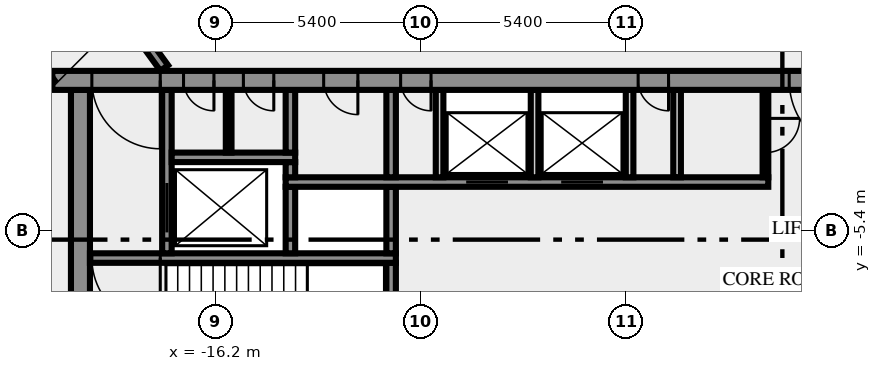
"""IFC4 building model, lengths in metres.
Left out: names, types, materials, properties, quantities, classifications, styles, units other than length and angle.
Written with IfcOpenShell. Run it as: python <this file> out.ifc"""

import sys

from ifc_helpers import new_model, si_unit, direction, frame, frame_2d, origin, place, context, subcontext, project, spatial, rectangle, extrude, element, fill, save


model = new_model("IFC4")
c1 = context("Model", 3, precision=1e-05, world=origin(), true_north=direction((0.0, 1.0)))
c2 = subcontext(c1, "Body", "Model", "MODEL_VIEW")
j1 = project(units=[si_unit("LENGTHUNIT", "METRE"), si_unit("PLANEANGLEUNIT", "RADIAN")], contexts=[c1])
p1 = place(None, origin())
s1 = spatial("IfcSite", under=j1, at=p1, CompositionType="ELEMENT")
p2 = place(p1, origin())
s2 = spatial("IfcBuilding", under=s1, at=p2, CompositionType="ELEMENT")
p3 = place(p2, frame((0.0, 0.0, 281.0)))
s3 = spatial("IfcBuildingStorey", under=s2, at=p3, CompositionType="ELEMENT", Elevation=281.0)
p4 = place(p3, frame((-19.75, -10.5, 0.0), z_axis=(0.0, 0.0, 1.0), x_axis=(0.0, 1.0, 0.0)))
e1 = element("IfcWall", 1, at=p4, inside=s3, PredefinedType="SHEAR", context=c2, shape_type="SweptSolid", body=[
    extrude(rectangle(XDim=8.8, YDim=0.5, at=frame_2d((4.4, 0.0))), origin(), (0.0, 0.0, 1.0), 3.65),
])
p5 = place(p3, frame((-11.575, -7.25, 0.0), z_axis=(0.0, 0.0, 1.0), x_axis=(0.0, 1.0, 0.0)))
e2 = element("IfcWall", 2, at=p5, inside=s3, PredefinedType="SHEAR", context=c2, shape_type="SweptSolid", body=[
    extrude(rectangle(XDim=1.0, YDim=0.25, at=frame_2d((0.5, 0.0))), origin(), (0.0, 0.0, 1.0), 3.65),
])
p6 = place(p3, frame((-11.45, -6.125, 0.0), z_axis=(0.0, 0.0, 1.0), x_axis=(-1.0, 0.0, 0.0)))
e3 = element("IfcWall", 3, at=p6, inside=s3, PredefinedType="SHEAR", context=c2, shape_type="SweptSolid", body=[
    extrude(rectangle(XDim=8.05, YDim=0.25, at=frame_2d((4.025, 0.0))), origin(), (0.0, 0.0, 1.0), 3.65),
])
p7 = place(p6, frame((6.2, 0.0, 0.0)))
e4 = element("IfcOpeningElement", 4, at=p7, cuts=e3, PredefinedType="OPENING", context=c2, shape_type="SweptSolid", body=[
    extrude(rectangle(XDim=1.8, YDim=2.1, at=frame_2d((0.9, 1.05))), frame((0.0, 0.135, 0.0), z_axis=(0.0, -1.0, 0.0), x_axis=(1.0, 0.0, 0.0)), (0.0, 0.0, 1.0), 0.27),
])
p8 = place(p3, frame((-17.475, -6.0, 0.0), z_axis=(0.0, 0.0, 1.0), x_axis=(0.0, 1.0, 0.0)))
e5 = element("IfcWall", 5, at=p8, inside=s3, PredefinedType="SHEAR", context=c2, shape_type="SweptSolid", body=[
    extrude(rectangle(XDim=4.3, YDim=0.25, at=frame_2d((2.15, 0.0))), origin(), (0.0, 0.0, 1.0), 3.65),
])
p9 = place(p8, frame((0.55, 0.0, 0.0)))
e6 = element("IfcOpeningElement", 6, at=p9, cuts=e5, PredefinedType="OPENING", context=c2, shape_type="SweptSolid", body=[
    extrude(rectangle(XDim=1.3, YDim=2.1, at=frame_2d((0.65, 1.05))), frame((0.0, 0.135, 0.0), z_axis=(0.0, -1.0, 0.0), x_axis=(1.0, 0.0, 0.0)), (0.0, 0.0, 1.0), 0.27),
])
for number, where, z_axis, x_axis in (
    (7, (-14.225, -6.0, 0.0), (0.0, 0.0, 1.0), (0.0, 1.0, 0.0)),
    (8, (-11.575, -6.0, 0.0), (0.0, 0.0, 1.0), (0.0, 1.0, 0.0)),
):
    element("IfcWall", number, at=place(p3, frame(where, z_axis=z_axis, x_axis=x_axis)), inside=s3, PredefinedType="SHEAR", context=c2, shape_type="SweptSolid", body=[
        extrude(rectangle(XDim=1.75, YDim=0.25, at=frame_2d((0.875, 0.0))), origin(), (0.0, 0.0, 1.0), 3.65),
    ])
p10 = place(p3, frame((-14.35, -4.125, 0.0), z_axis=(0.0, 0.0, 1.0), x_axis=(1.0, 0.0, 0.0)))
e9 = element("IfcWall", 9, at=p10, inside=s3, PredefinedType="SHEAR", context=c2, shape_type="SweptSolid", body=[
    extrude(rectangle(XDim=12.7, YDim=0.25, at=frame_2d((6.35, 0.0))), origin(), (0.0, 0.0, 1.0), 3.65),
])
p11 = place(p10, frame((4.75, 0.0, 0.0)))
e10 = element("IfcOpeningElement", 10, at=p11, cuts=e9, PredefinedType="OPENING", context=c2, shape_type="SweptSolid", body=[
    extrude(rectangle(XDim=1.1, YDim=2.1, at=frame_2d((0.55, 1.05))), frame((0.0, 0.135, 0.0), z_axis=(0.0, -1.0, 0.0), x_axis=(1.0, 0.0, 0.0)), (0.0, 0.0, 1.0), 0.27),
])
p12 = place(p10, frame((7.25, 0.0, 0.0)))
e11 = element("IfcOpeningElement", 11, at=p12, cuts=e9, PredefinedType="OPENING", context=c2, shape_type="SweptSolid", body=[
    extrude(rectangle(XDim=1.1, YDim=2.1, at=frame_2d((0.55, 1.05))), frame((0.0, 0.135, 0.0), z_axis=(0.0, -1.0, 0.0), x_axis=(1.0, 0.0, 0.0)), (0.0, 0.0, 1.0), 0.27),
])
p13 = place(p3, frame((-14.225, -4.0, 0.0), z_axis=(0.0, 0.0, 1.0), x_axis=(0.0, 1.0, 0.0)))
e12 = element("IfcWall", 12, at=p13, inside=s3, PredefinedType="SHEAR", context=c2, shape_type="SweptSolid", body=[
    extrude(rectangle(XDim=0.4, YDim=0.25, at=frame_2d((0.2, 0.0))), origin(), (0.0, 0.0, 1.0), 3.65),
])
p14 = place(p3, frame((-11.575, -4.0, 0.0), z_axis=(0.0, 0.0, 1.0), x_axis=(0.0, 1.0, 0.0)))
e13 = element("IfcWall", 13, at=p14, inside=s3, PredefinedType="SHEAR", context=c2, shape_type="SweptSolid", body=[
    extrude(rectangle(XDim=2.3, YDim=0.25, at=frame_2d((1.15, 0.0))), origin(), (0.0, 0.0, 1.0), 3.65),
])
for number, where, z_axis, x_axis in (
    (14, (-10.3, -4.0, 0.0), (0.0, 0.0, 1.0), (0.0, 1.0, 0.0)),
    (15, (-7.8, -4.0, 0.0), (0.0, 0.0, 1.0), (0.0, 1.0, 0.0)),
    (16, (-5.3, -4.0, 0.0), (0.0, 0.0, 1.0), (0.0, 1.0, 0.0)),
    (17, (-4.05, -4.0, 0.0), (0.0, 0.0, 1.0), (0.0, 1.0, 0.0)),
):
    element("IfcWall", number, at=place(p3, frame(where, z_axis=z_axis, x_axis=x_axis)), inside=s3, PredefinedType="SOLIDWALL", context=c2, shape_type="SweptSolid", body=[
        extrude(rectangle(XDim=2.3, YDim=0.2, at=frame_2d((1.15, 0.0))), origin(), (0.0, 0.0, 1.0), 3.65),
    ])
p15 = place(p3, frame((-1.725, -1.7, 0.0), z_axis=(0.0, 0.0, 1.0), x_axis=(0.0, -1.0, 0.0)))
e18 = element("IfcWall", 18, at=p15, inside=s3, PredefinedType="PARTITIONING", context=c2, shape_type="SweptSolid", body=[
    extrude(rectangle(XDim=2.3, YDim=0.15, at=frame_2d((1.15, 0.0))), origin(), (0.0, 0.0, 1.0), 3.65),
])
p16 = place(p15, frame((0.75, 0.0, 0.0)))
e19 = element("IfcOpeningElement", 19, at=p16, cuts=e18, PredefinedType="OPENING", context=c2, shape_type="SweptSolid", body=[
    extrude(rectangle(XDim=0.9, YDim=2.1, at=frame_2d((0.45, 1.05))), frame((0.0, 0.085, 0.0), z_axis=(0.0, -1.0, 0.0), x_axis=(1.0, 0.0, 0.0)), (0.0, 0.0, 1.0), 0.17),
])
p17 = place(p3, frame((-17.35, -3.475, 0.0), z_axis=(0.0, 0.0, 1.0), x_axis=(1.0, 0.0, 0.0)))
e20 = element("IfcWall", 20, at=p17, inside=s3, PredefinedType="SHEAR", context=c2, shape_type="SweptSolid", body=[
    extrude(rectangle(XDim=3.25, YDim=0.25, at=frame_2d((1.625, 0.0))), origin(), (0.0, 0.0, 1.0), 3.65),
])
p18 = place(p3, frame((-15.85, -3.35, 0.0), z_axis=(0.0, 0.0, 1.0), x_axis=(0.0, 1.0, 0.0)))
e21 = element("IfcWall", 21, at=p18, inside=s3, PredefinedType="PARTITIONING", context=c2, shape_type="SweptSolid", body=[
    extrude(rectangle(XDim=1.65, YDim=0.15, at=frame_2d((0.825, 0.0))), origin(), (0.0, 0.0, 1.0), 3.65),
])
p19 = place(p3, frame((-14.225, -3.35, 0.0), z_axis=(0.0, 0.0, 1.0), x_axis=(0.0, 1.0, 0.0)))
e22 = element("IfcWall", 22, at=p19, inside=s3, PredefinedType="SHEAR", context=c2, shape_type="SweptSolid", body=[
    extrude(rectangle(XDim=1.65, YDim=0.25, at=frame_2d((0.825, 0.0))), origin(), (0.0, 0.0, 1.0), 3.65),
])
p20 = place(p3, frame((20.49, -1.45, 0.0), z_axis=(0.0, 0.0, 1.0), x_axis=(-1.0, 0.0, 0.0)))
e23 = element("IfcWall", 23, at=p20, inside=s3, PredefinedType="SHEAR", context=c2, shape_type="SweptSolid", body=[
    extrude(rectangle(XDim=40.98, YDim=0.5, at=frame_2d((20.49, 0.0))), origin(), (0.0, 0.0, 1.0), 3.65),
])
p21 = place(p20, frame((38.14, 0.0, 0.0)))
e24 = element("IfcOpeningElement", 24, at=p21, cuts=e23, PredefinedType="OPENING", context=c2, shape_type="SweptSolid", body=[
    extrude(rectangle(XDim=1.8, YDim=2.1, at=frame_2d((0.9, 1.05))), frame((0.0, 0.26, 0.0), z_axis=(0.0, -1.0, 0.0), x_axis=(1.0, 0.0, 0.0)), (0.0, 0.0, 1.0), 0.52),
])
p22 = place(p20, frame((36.728, 0.0, 0.0)))
e25 = element("IfcOpeningElement", 25, at=p22, cuts=e23, PredefinedType="OPENING", context=c2, shape_type="SweptSolid", body=[
    extrude(rectangle(XDim=0.8, YDim=2.1, at=frame_2d((0.4, 1.05))), frame((0.0, 0.26, 0.0), z_axis=(0.0, -1.0, 0.0), x_axis=(1.0, 0.0, 0.0)), (0.0, 0.0, 1.0), 0.52),
])
p23 = place(p20, frame((35.153, 0.0, 0.0)))
e26 = element("IfcOpeningElement", 26, at=p23, cuts=e23, PredefinedType="OPENING", context=c2, shape_type="SweptSolid", body=[
    extrude(rectangle(XDim=0.8, YDim=2.1, at=frame_2d((0.4, 1.05))), frame((0.0, 0.26, 0.0), z_axis=(0.0, -1.0, 0.0), x_axis=(1.0, 0.0, 0.0)), (0.0, 0.0, 1.0), 0.52),
])
p24 = place(p20, frame((32.94, 0.0, 0.0)))
e27 = element("IfcOpeningElement", 27, at=p24, cuts=e23, PredefinedType="OPENING", context=c2, shape_type="SweptSolid", body=[
    extrude(rectangle(XDim=0.9, YDim=2.1, at=frame_2d((0.45, 1.05))), frame((0.0, 0.26, 0.0), z_axis=(0.0, -1.0, 0.0), x_axis=(1.0, 0.0, 0.0)), (0.0, 0.0, 1.0), 0.52),
])
p25 = place(p20, frame((31.015, 0.0, 0.0)))
e28 = element("IfcOpeningElement", 28, at=p25, cuts=e23, PredefinedType="OPENING", context=c2, shape_type="SweptSolid", body=[
    extrude(rectangle(XDim=0.8, YDim=2.1, at=frame_2d((0.4, 1.05))), frame((0.0, 0.26, 0.0), z_axis=(0.0, -1.0, 0.0), x_axis=(1.0, 0.0, 0.0)), (0.0, 0.0, 1.0), 0.52),
])
p26 = place(p20, frame((24.765, 0.0, 0.0)))
e29 = element("IfcOpeningElement", 29, at=p26, cuts=e23, PredefinedType="OPENING", context=c2, shape_type="SweptSolid", body=[
    extrude(rectangle(XDim=0.8, YDim=2.1, at=frame_2d((0.4, 1.05))), frame((0.0, 0.26, 0.0), z_axis=(0.0, -1.0, 0.0), x_axis=(1.0, 0.0, 0.0)), (0.0, 0.0, 1.0), 0.52),
])
p27 = place(p20, frame((19.59, 0.0, 0.0)))
e30 = element("IfcOpeningElement", 30, at=p27, cuts=e23, PredefinedType="OPENING", context=c2, shape_type="SweptSolid", body=[
    extrude(rectangle(XDim=2.0, YDim=2.1, at=frame_2d((1.0, 1.05))), frame((0.0, 0.26, 0.0), z_axis=(0.0, -1.0, 0.0), x_axis=(1.0, 0.0, 0.0)), (0.0, 0.0, 1.0), 0.52),
])
p28 = place(p20, frame((13.202, 0.0, 0.0)))
e31 = element("IfcOpeningElement", 31, at=p28, cuts=e23, PredefinedType="OPENING", context=c2, shape_type="SweptSolid", body=[
    extrude(rectangle(XDim=0.9, YDim=2.1, at=frame_2d((0.45, 1.05))), frame((0.0, 0.26, 0.0), z_axis=(0.0, -1.0, 0.0), x_axis=(1.0, 0.0, 0.0)), (0.0, 0.0, 1.0), 0.52),
])
p29 = place(p20, frame((9.478, 0.0, 0.0)))
e32 = element("IfcOpeningElement", 32, at=p29, cuts=e23, PredefinedType="OPENING", context=c2, shape_type="SweptSolid", body=[
    extrude(rectangle(XDim=0.9, YDim=2.1, at=frame_2d((0.45, 1.05))), frame((0.0, 0.26, 0.0), z_axis=(0.0, -1.0, 0.0), x_axis=(1.0, 0.0, 0.0)), (0.0, 0.0, 1.0), 0.52),
])
p30 = place(p20, frame((7.14, 0.0, 0.0)))
e33 = element("IfcOpeningElement", 33, at=p30, cuts=e23, PredefinedType="OPENING", context=c2, shape_type="SweptSolid", body=[
    extrude(rectangle(XDim=0.9, YDim=2.1, at=frame_2d((0.45, 1.05))), frame((0.0, 0.26, 0.0), z_axis=(0.0, -1.0, 0.0), x_axis=(1.0, 0.0, 0.0)), (0.0, 0.0, 1.0), 0.52),
])
p31 = place(p20, frame((4.19, 0.0, 0.0)))
e34 = element("IfcOpeningElement", 34, at=p31, cuts=e23, PredefinedType="OPENING", context=c2, shape_type="SweptSolid", body=[
    extrude(rectangle(XDim=0.9, YDim=2.1, at=frame_2d((0.45, 1.05))), frame((0.0, 0.26, 0.0), z_axis=(0.0, -1.0, 0.0), x_axis=(1.0, 0.0, 0.0)), (0.0, 0.0, 1.0), 0.52),
])
p32 = place(p20, frame((1.04, 0.0, 0.0)))
e35 = element("IfcOpeningElement", 35, at=p32, cuts=e23, PredefinedType="OPENING", context=c2, shape_type="SweptSolid", body=[
    extrude(rectangle(XDim=1.8, YDim=2.1, at=frame_2d((0.9, 1.05))), frame((0.0, 0.26, 0.0), z_axis=(0.0, -1.0, 0.0), x_axis=(1.0, 0.0, 0.0)), (0.0, 0.0, 1.0), 0.52),
])
p33 = place(p3, frame((-20.531, -1.523, 0.0), z_axis=(0.0, 0.0, 1.0), x_axis=(-0.587786711753, 0.809015934013, 0.0)))
e36 = element("IfcWall", 36, at=p33, inside=s3, PredefinedType="SOLIDWALL", context=c2, shape_type="SweptSolid", body=[
    extrude(rectangle(XDim=21.911, YDim=0.25, at=frame_2d((10.956, 0.0))), origin(), (0.0, 0.0, 1.0), 3.65),
])
p34 = place(p33, frame((0.533, 0.0, 0.0)))
e37 = element("IfcOpeningElement", 37, at=p34, cuts=e36, PredefinedType="OPENING", context=c2, shape_type="SweptSolid", body=[
    extrude(rectangle(XDim=0.9, YDim=2.1, at=frame_2d((0.45, 1.05))), frame((0.0, 0.135, 0.0), z_axis=(0.0, -1.0, 0.0), x_axis=(1.0, 0.0, 0.0)), (0.0, 0.0, 1.0), 0.27),
])
p35 = place(p33, frame((7.816, 0.0, 0.0)))
e38 = element("IfcOpeningElement", 38, at=p35, cuts=e36, PredefinedType="OPENING", context=c2, shape_type="SweptSolid", body=[
    extrude(rectangle(XDim=0.9, YDim=2.1, at=frame_2d((0.45, 1.05))), frame((0.0, 0.135, 0.0), z_axis=(0.0, -1.0, 0.0), x_axis=(1.0, 0.0, 0.0)), (0.0, 0.0, 1.0), 0.27),
])
p36 = place(p3, frame((-31.267, 17.762, 0.0), z_axis=(0.0, 0.0, 1.0), x_axis=(0.587787966774, -0.809015022181, 0.0)))
e39 = element("IfcWall", 39, at=p36, inside=s3, PredefinedType="SOLIDWALL", context=c2, shape_type="SweptSolid", body=[
    extrude(rectangle(XDim=23.345, YDim=0.25, at=frame_2d((11.672, 0.0))), origin(), (0.0, 0.0, 1.0), 3.65),
])
p37 = place(p36, frame((19.004, 0.0, 0.0)))
e40 = element("IfcOpeningElement", 40, at=p37, cuts=e39, PredefinedType="OPENING", context=c2, shape_type="SweptSolid", body=[
    extrude(rectangle(XDim=0.9, YDim=2.1, at=frame_2d((0.45, 1.05))), frame((0.0, 0.135, 0.0), z_axis=(0.0, -1.0, 0.0), x_axis=(1.0, 0.0, 0.0)), (0.0, 0.0, 1.0), 0.27),
])
p38 = place(p7, origin())
e41 = element("IfcDoor", 41, at=p38, inside=s3, OperationType="DOUBLE_DOOR_SINGLE_SWING", PredefinedType="DOOR", context=c2, shape_type="SweptSolid", body=[
    extrude(rectangle(XDim=1.8, YDim=2.1, at=frame_2d((0.9, 1.05))), frame((0.0, 0.025, 0.0), z_axis=(0.0, -1.0, 0.0), x_axis=(1.0, 0.0, 0.0)), (0.0, 0.0, 1.0), 0.05),
])
fill(e4, e41)
p39 = place(p9, origin())
e42 = element("IfcDoor", 42, at=p39, inside=s3, OperationType="DOUBLE_DOOR_SLIDING", PredefinedType="DOOR", context=c2, shape_type="SweptSolid", body=[
    extrude(rectangle(XDim=1.3, YDim=2.1, at=frame_2d((0.65, 1.05))), frame((0.0, 0.025, 0.0), z_axis=(0.0, -1.0, 0.0), x_axis=(1.0, 0.0, 0.0)), (0.0, 0.0, 1.0), 0.05),
])
fill(e6, e42)
p40 = place(p11, origin())
e43 = element("IfcDoor", 43, at=p40, inside=s3, OperationType="DOUBLE_DOOR_SLIDING", PredefinedType="DOOR", context=c2, shape_type="SweptSolid", body=[
    extrude(rectangle(XDim=1.1, YDim=2.1, at=frame_2d((0.55, 1.05))), frame((0.0, 0.025, 0.0), z_axis=(0.0, -1.0, 0.0), x_axis=(1.0, 0.0, 0.0)), (0.0, 0.0, 1.0), 0.05),
])
fill(e10, e43)
p41 = place(p12, origin())
e44 = element("IfcDoor", 44, at=p41, inside=s3, OperationType="DOUBLE_DOOR_SLIDING", PredefinedType="DOOR", context=c2, shape_type="SweptSolid", body=[
    extrude(rectangle(XDim=1.1, YDim=2.1, at=frame_2d((0.55, 1.05))), frame((0.0, 0.025, 0.0), z_axis=(0.0, -1.0, 0.0), x_axis=(1.0, 0.0, 0.0)), (0.0, 0.0, 1.0), 0.05),
])
fill(e11, e44)
p42 = place(p16, origin())
e45 = element("IfcDoor", 45, at=p42, inside=s3, OperationType="SINGLE_SWING_RIGHT", PredefinedType="DOOR", context=c2, shape_type="SweptSolid", body=[
    extrude(rectangle(XDim=0.9, YDim=2.1, at=frame_2d((0.45, 1.05))), frame((0.0, 0.025, 0.0), z_axis=(0.0, -1.0, 0.0), x_axis=(1.0, 0.0, 0.0)), (0.0, 0.0, 1.0), 0.05),
])
fill(e19, e45)
p43 = place(p21, origin())
e46 = element("IfcDoor", 46, at=p43, inside=s3, OperationType="DOUBLE_DOOR_SINGLE_SWING", PredefinedType="DOOR", context=c2, shape_type="SweptSolid", body=[
    extrude(rectangle(XDim=1.8, YDim=2.1, at=frame_2d((0.9, 1.05))), frame((0.0, 0.025, 0.0), z_axis=(0.0, -1.0, 0.0), x_axis=(1.0, 0.0, 0.0)), (0.0, 0.0, 1.0), 0.05),
])
fill(e24, e46)
p44 = place(p22, origin())
e47 = element("IfcDoor", 47, at=p44, inside=s3, OperationType="SINGLE_SWING_RIGHT", PredefinedType="DOOR", context=c2, shape_type="SweptSolid", body=[
    extrude(rectangle(XDim=0.8, YDim=2.1, at=frame_2d((0.4, 1.05))), frame((0.0, 0.025, 0.0), z_axis=(0.0, -1.0, 0.0), x_axis=(1.0, 0.0, 0.0)), (0.0, 0.0, 1.0), 0.05),
])
fill(e25, e47)
p45 = place(p23, origin())
e48 = element("IfcDoor", 48, at=p45, inside=s3, OperationType="SINGLE_SWING_RIGHT", PredefinedType="DOOR", context=c2, shape_type="SweptSolid", body=[
    extrude(rectangle(XDim=0.8, YDim=2.1, at=frame_2d((0.4, 1.05))), frame((0.0, 0.025, 0.0), z_axis=(0.0, -1.0, 0.0), x_axis=(1.0, 0.0, 0.0)), (0.0, 0.0, 1.0), 0.05),
])
fill(e26, e48)
p46 = place(p24, origin())
e49 = element("IfcDoor", 49, at=p46, inside=s3, OperationType="SINGLE_SWING_RIGHT", PredefinedType="DOOR", context=c2, shape_type="SweptSolid", body=[
    extrude(rectangle(XDim=0.9, YDim=2.1, at=frame_2d((0.45, 1.05))), frame((0.0, 0.025, 0.0), z_axis=(0.0, -1.0, 0.0), x_axis=(1.0, 0.0, 0.0)), (0.0, 0.0, 1.0), 0.05),
])
fill(e27, e49)
p47 = place(p25, origin())
e50 = element("IfcDoor", 50, at=p47, inside=s3, OperationType="SINGLE_SWING_RIGHT", PredefinedType="DOOR", context=c2, shape_type="SweptSolid", body=[
    extrude(rectangle(XDim=0.8, YDim=2.1, at=frame_2d((0.4, 1.05))), frame((0.0, 0.025, 0.0), z_axis=(0.0, -1.0, 0.0), x_axis=(1.0, 0.0, 0.0)), (0.0, 0.0, 1.0), 0.05),
])
fill(e28, e50)
p48 = place(p26, origin())
e51 = element("IfcDoor", 51, at=p48, inside=s3, OperationType="SINGLE_SWING_RIGHT", PredefinedType="DOOR", context=c2, shape_type="SweptSolid", body=[
    extrude(rectangle(XDim=0.8, YDim=2.1, at=frame_2d((0.4, 1.05))), frame((0.0, 0.025, 0.0), z_axis=(0.0, -1.0, 0.0), x_axis=(1.0, 0.0, 0.0)), (0.0, 0.0, 1.0), 0.05),
])
fill(e29, e51)
p49 = place(p27, origin())
e52 = element("IfcDoor", 52, at=p49, inside=s3, OperationType="DOUBLE_DOOR_SINGLE_SWING", PredefinedType="DOOR", context=c2, shape_type="SweptSolid", body=[
    extrude(rectangle(XDim=2.0, YDim=2.1, at=frame_2d((1.0, 1.05))), frame((0.0, 0.025, 0.0), z_axis=(0.0, -1.0, 0.0), x_axis=(1.0, 0.0, 0.0)), (0.0, 0.0, 1.0), 0.05),
])
fill(e30, e52)
save(model, sys.argv[1])
